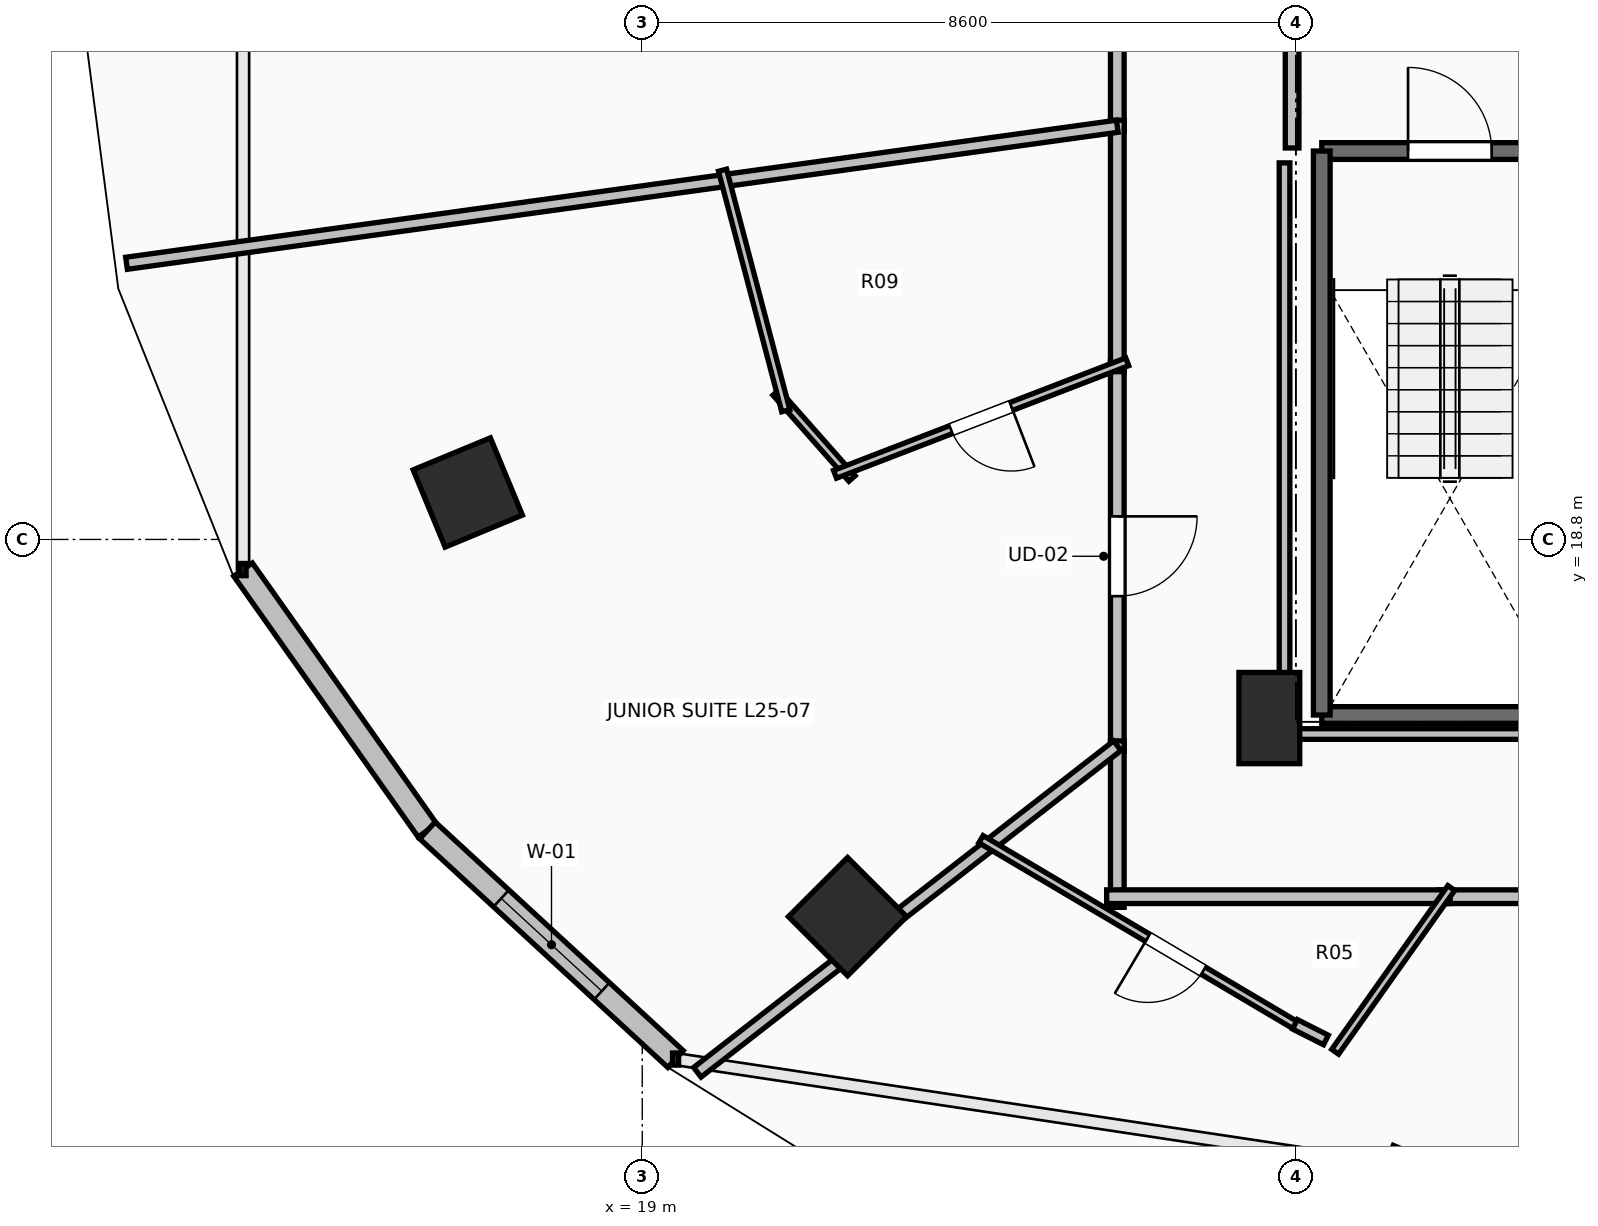
"""IFC4 building model, lengths in metres.
Left out: names, types, materials, properties, quantities, classifications, styles, units other than length and angle.
Written with IfcOpenShell. Run it as: python <this file> out.ifc"""

import sys

from ifc_helpers import new_model, si_unit, direction, frame, frame_2d, origin, origin_2d, place, context, subcontext, project, spatial, rectangle, extrude, element, fill, save


model = new_model("IFC4")
c1 = context("Model", 3, precision=1e-05, world=origin(), true_north=direction((0.0, 1.0)))
c2 = subcontext(c1, "Body", "Model", "MODEL_VIEW")
j1 = project(units=[si_unit("LENGTHUNIT", "METRE"), si_unit("PLANEANGLEUNIT", "RADIAN")], contexts=[c1])
p1 = place(None, origin())
s1 = spatial("IfcSite", under=j1, at=p1, CompositionType="ELEMENT")
p2 = place(p1, origin())
s2 = spatial("IfcBuilding", under=s1, at=p2, CompositionType="ELEMENT")
p3 = place(p2, frame((0.0, 0.0, 96.3)))
s3 = spatial("IfcBuildingStorey", under=s2, at=p3, CompositionType="ELEMENT", Elevation=96.3)
for number, where, z_axis, x_axis in (
    (1, (16.705, 19.418, 0.0), (0.0, 0.0, 1.0), (-0.924, -0.383, 0.0)),
    (2, (21.701, 13.838, 0.0), (0.0, 0.0, 1.0), (-0.707, -0.707, 0.0)),
    (3, (29.179, 10.109, 0.0), (0.0, 0.0, 1.0), (-0.383, -0.924, 0.0)),
):
    element("IfcColumn", number, at=place(p3, frame(where, z_axis=z_axis, x_axis=x_axis)), inside=s3, PredefinedType="COLUMN", context=c2, shape_type="SweptSolid", body=[
        extrude(rectangle(XDim=1.1, YDim=1.1, at=origin_2d()), origin(), (0.0, 0.0, 1.0), 3.5),
    ])
p4 = place(p3, frame((27.25, 16.45, 0.0), z_axis=(0.0, 0.0, 1.0), x_axis=(1.0, 0.0, 0.0)))
e4 = element("IfcColumn", 4, at=p4, inside=s3, PredefinedType="PILASTER", context=c2, shape_type="SweptSolid", body=[
    extrude(rectangle(XDim=0.8, YDim=1.2, at=origin_2d()), origin(), (0.0, 0.0, 1.0), 3.5),
])
p5 = place(p3, frame((13.748, 18.404, 0.0), z_axis=(0.0, 0.0, 1.0), x_axis=(0.57716435238, -0.81662801222, 0.0)))
e5 = element("IfcWall", 5, at=p5, inside=s3, PredefinedType="STANDARD", context=c2, shape_type="SweptSolid", body=[
    extrude(rectangle(XDim=4.202, YDim=0.3, at=frame_2d((2.101, 0.0))), origin(), (0.0, 0.0, 1.0), 3.24),
])
p6 = place(p3, frame((16.174, 14.972, 0.0), z_axis=(0.0, 0.0, 1.0), x_axis=(0.735416718093, -0.677615119924, 0.0)))
e6 = element("IfcWall", 6, at=p6, inside=s3, PredefinedType="STANDARD", context=c2, shape_type="SweptSolid", body=[
    extrude(rectangle(XDim=4.439, YDim=0.3, at=frame_2d((2.22, 0.0))), origin(), (0.0, 0.0, 1.0), 3.24),
])
p7 = place(p6, frame((1.32, 0.0, 0.85)))
e7 = element("IfcOpeningElement", 7, at=p7, cuts=e6, PredefinedType="OPENING", context=c2, shape_type="SweptSolid", body=[
    extrude(rectangle(XDim=1.8, YDim=2.19, at=frame_2d((0.9, 1.095))), frame((0.0, 0.165, 0.0), z_axis=(0.0, -1.0, 0.0), x_axis=(1.0, 0.0, 0.0)), (0.0, 0.0, 1.0), 0.33),
])
p8 = place(p3, frame((27.94, 23.91, 0.0), z_axis=(0.0, 0.0, 1.0), x_axis=(1.0, 0.0, 0.0)))
e8 = element("IfcWall", 8, at=p8, inside=s3, PredefinedType="SOLIDWALL", context=c2, shape_type="SweptSolid", body=[
    extrude(rectangle(XDim=3.37, YDim=0.22, at=frame_2d((1.685, 0.0))), origin(), (0.0, 0.0, 1.0), 3.24),
])
p9 = place(p8, frame((1.135, 0.0, 0.0)))
e9 = element("IfcOpeningElement", 9, at=p9, cuts=e8, PredefinedType="OPENING", context=c2, shape_type="SweptSolid", body=[
    extrude(rectangle(XDim=1.1, YDim=2.15, at=frame_2d((0.55, 1.075))), frame((0.0, 0.125, 0.0), z_axis=(0.0, -1.0, 0.0), x_axis=(1.0, 0.0, 0.0)), (0.0, 0.0, 1.0), 0.25),
])
p10 = place(p3, frame((31.31, 16.49, 0.0), z_axis=(0.0, 0.0, 1.0), x_axis=(-1.0, 0.0, 0.0)))
e10 = element("IfcWall", 10, at=p10, inside=s3, PredefinedType="SOLIDWALL", context=c2, shape_type="SweptSolid", body=[
    extrude(rectangle(XDim=3.37, YDim=0.22, at=frame_2d((1.685, 0.0))), origin(), (0.0, 0.0, 1.0), 3.24),
])
p11 = place(p3, frame((27.94, 16.49, 0.0), z_axis=(0.0, 0.0, 1.0), x_axis=(0.0, 1.0, 0.0)))
e11 = element("IfcWall", 11, at=p11, inside=s3, PredefinedType="SOLIDWALL", context=c2, shape_type="SweptSolid", body=[
    extrude(rectangle(XDim=7.42, YDim=0.22, at=frame_2d((3.71, 0.0))), origin(), (0.0, 0.0, 1.0), 3.24),
])
p12 = place(p3, frame((27.55, 28.0, 0.0), z_axis=(0.0, 0.0, 1.0), x_axis=(0.0, -1.0, 0.0)))
e12 = element("IfcWall", 12, at=p12, inside=s3, PredefinedType="PARTITIONING", context=c2, shape_type="SweptSolid", body=[
    extrude(rectangle(XDim=4.05, YDim=0.18, at=frame_2d((2.025, 0.0))), origin(), (0.0, 0.0, 1.0), 3.24),
])
p13 = place(p12, frame((1.425, 0.0, 0.0)))
e13 = element("IfcOpeningElement", 13, at=p13, cuts=e12, PredefinedType="OPENING", context=c2, shape_type="SweptSolid", body=[
    extrude(rectangle(XDim=1.2, YDim=2.15, at=frame_2d((0.6, 1.075))), frame((0.0, 0.105, 0.0), z_axis=(0.0, -1.0, 0.0), x_axis=(1.0, 0.0, 0.0)), (0.0, 0.0, 1.0), 0.21),
])
p14 = place(p3, frame((25.25, 28.065, 0.0), z_axis=(0.0, 0.0, 1.0), x_axis=(0.0, -1.0, 0.0)))
e14 = element("IfcWall", 14, at=p14, inside=s3, PredefinedType="PARTITIONING", context=c2, shape_type="SweptSolid", body=[
    extrude(rectangle(XDim=3.89, YDim=0.18, at=frame_2d((1.945, 0.0))), origin(), (0.0, 0.0, 1.0), 2.432),
])
p15 = place(p14, frame((1.42, 0.0, 0.0)))
e15 = element("IfcOpeningElement", 15, at=p15, cuts=e14, PredefinedType="OPENING", context=c2, shape_type="SweptSolid", body=[
    extrude(rectangle(XDim=1.05, YDim=2.2, at=frame_2d((0.525, 1.1))), frame((0.0, 0.105, 0.0), z_axis=(0.0, -1.0, 0.0), x_axis=(1.0, 0.0, 0.0)), (0.0, 0.0, 1.0), 0.21),
])
p16 = place(p3, frame((25.25, 21.147, 0.0), z_axis=(0.0, 0.0, 1.0), x_axis=(0.0, -1.0, 0.0)))
e16 = element("IfcWall", 16, at=p16, inside=s3, PredefinedType="PARTITIONING", context=c2, shape_type="SweptSolid", body=[
    extrude(rectangle(XDim=5.137, YDim=0.18, at=frame_2d((2.568, 0.0))), origin(), (0.0, 0.0, 1.0), 2.432),
])
p17 = place(p16, frame((2.043, 0.0, 0.0)))
e17 = element("IfcOpeningElement", 17, at=p17, cuts=e16, PredefinedType="OPENING", context=c2, shape_type="SweptSolid", body=[
    extrude(rectangle(XDim=1.05, YDim=2.2, at=frame_2d((0.525, 1.1))), frame((0.0, 0.105, 0.0), z_axis=(0.0, -1.0, 0.0), x_axis=(1.0, 0.0, 0.0)), (0.0, 0.0, 1.0), 0.21),
])
p18 = place(p3, frame((25.25, 24.315, 0.0), z_axis=(0.0, 0.0, 1.0), x_axis=(0.0, -1.0, 0.0)))
e18 = element("IfcWall", 18, at=p18, inside=s3, PredefinedType="PARTITIONING", context=c2, shape_type="SweptSolid", body=[
    extrude(rectangle(XDim=3.308, YDim=0.18, at=frame_2d((1.654, 0.0))), origin(), (0.0, 0.0, 1.0), 3.24),
])
p19 = place(p3, frame((29.489, 14.1, 0.0), z_axis=(0.0, 0.0, 1.0), x_axis=(1.0, 0.0, 0.0)))
e19 = element("IfcWall", 19, at=p19, inside=s3, PredefinedType="PARTITIONING", context=c2, shape_type="SweptSolid", body=[
    extrude(rectangle(XDim=3.729, YDim=0.18, at=frame_2d((1.865, 0.0))), origin(), (0.0, 0.0, 1.0), 3.24),
])
p20 = place(p19, frame((1.365, 0.0, 0.0)))
e20 = element("IfcOpeningElement", 20, at=p20, cuts=e19, PredefinedType="OPENING", context=c2, shape_type="SweptSolid", body=[
    extrude(rectangle(XDim=1.0, YDim=2.15, at=frame_2d((0.5, 1.075))), frame((0.0, 0.105, 0.0), z_axis=(0.0, -1.0, 0.0), x_axis=(1.0, 0.0, 0.0)), (0.0, 0.0, 1.0), 0.21),
])
p21 = place(p3, frame((25.25, 16.15, 0.0), z_axis=(0.0, 0.0, 1.0), x_axis=(0.0, -1.0, 0.0)))
e21 = element("IfcWall", 21, at=p21, inside=s3, PredefinedType="PARTITIONING", context=c2, shape_type="SweptSolid", body=[
    extrude(rectangle(XDim=2.19, YDim=0.18, at=frame_2d((1.095, 0.0))), origin(), (0.0, 0.0, 1.0), 2.432),
])
p22 = place(p3, frame((25.11, 14.1, 0.0), z_axis=(0.0, 0.0, 1.0), x_axis=(1.0, 0.0, 0.0)))
e22 = element("IfcWall", 22, at=p22, inside=s3, PredefinedType="PARTITIONING", context=c2, shape_type="SweptSolid", body=[
    extrude(rectangle(XDim=4.519, YDim=0.18, at=frame_2d((2.259, 0.0))), origin(), (0.0, 0.0, 1.0), 2.432),
])
p23 = place(p3, frame((12.215, 22.433, 0.0), z_axis=(0.0, 0.0, 1.0), x_axis=(0.990569013426, 0.137014705927, 0.0)))
e23 = element("IfcWall", 23, at=p23, inside=s3, PredefinedType="PARTITIONING", context=c2, shape_type="SweptSolid", body=[
    extrude(rectangle(XDim=13.159, YDim=0.16, at=frame_2d((6.58, 0.0))), origin(), (0.0, 0.0, 1.0), 2.677),
])
p24 = place(p3, frame((21.76, 19.602, 0.0), z_axis=(0.0, 0.0, 1.0), x_axis=(-0.661931735756, 0.749564124808, 0.0)))
e24 = element("IfcWall", 24, at=p24, inside=s3, PredefinedType="PARTITIONING", context=c2, shape_type="SweptSolid", body=[
    extrude(rectangle(XDim=1.51, YDim=0.11, at=frame_2d((0.755, 0.0))), origin(), (0.0, 0.0, 1.0), 3.24),
])
p25 = place(p3, frame((20.889, 20.494, 0.0), z_axis=(0.0, 0.0, 1.0), x_axis=(-0.254405137241, 0.967097733502, 0.0)))
e25 = element("IfcWall", 25, at=p25, inside=s3, PredefinedType="PARTITIONING", context=c2, shape_type="SweptSolid", body=[
    extrude(rectangle(XDim=3.271, YDim=0.11, at=frame_2d((1.636, 0.0))), origin(), (0.0, 0.0, 1.0), 2.922),
])
p26 = place(p3, frame((25.381, 21.137, 0.0), z_axis=(0.0, 0.0, 1.0), x_axis=(-0.933189718051, -0.359384126144, 0.0)))
e26 = element("IfcWall", 26, at=p26, inside=s3, PredefinedType="PARTITIONING", context=c2, shape_type="SweptSolid", body=[
    extrude(rectangle(XDim=4.119, YDim=0.11, at=frame_2d((2.06, 0.0))), origin(), (0.0, 0.0, 1.0), 2.972),
])
p27 = place(p26, frame((1.635, 0.0, 0.0)))
e27 = element("IfcOpeningElement", 27, at=p27, cuts=e26, PredefinedType="OPENING", context=c2, shape_type="SweptSolid", body=[
    extrude(rectangle(XDim=0.85, YDim=2.1, at=frame_2d((0.425, 1.05))), frame((0.0, 0.07, 0.0), z_axis=(0.0, -1.0, 0.0), x_axis=(1.0, 0.0, 0.0)), (0.0, 0.0, 1.0), 0.14),
])
p28 = place(p3, frame((19.725, 11.79, 0.0), z_axis=(0.0, 0.0, 1.0), x_axis=(0.789438616042, 0.613829513384, 0.0)))
e28 = element("IfcWall", 28, at=p28, inside=s3, PredefinedType="PARTITIONING", context=c2, shape_type="SweptSolid", body=[
    extrude(rectangle(XDim=6.999, YDim=0.16, at=frame_2d((3.499, 0.0))), origin(), (0.0, 0.0, 1.0), 2.432),
])
p29 = place(p3, frame((27.611, 12.399, 0.0), z_axis=(0.0, 0.0, 1.0), x_axis=(-0.860667615303, 0.509167218081, 0.0)))
e29 = element("IfcWall", 29, at=p29, inside=s3, PredefinedType="PARTITIONING", context=c2, shape_type="SweptSolid", body=[
    extrude(rectangle(XDim=4.827, YDim=0.11, at=frame_2d((2.413, 0.0))), origin(), (0.0, 0.0, 1.0), 2.432),
])
p30 = place(p29, frame((1.428, 0.0, 0.0)))
e30 = element("IfcOpeningElement", 30, at=p30, cuts=e29, PredefinedType="OPENING", context=c2, shape_type="SweptSolid", body=[
    extrude(rectangle(XDim=0.85, YDim=2.1, at=frame_2d((0.425, 1.05))), frame((0.0, 0.07, 0.0), z_axis=(0.0, -1.0, 0.0), x_axis=(1.0, 0.0, 0.0)), (0.0, 0.0, 1.0), 0.14),
])
p31 = place(p3, frame((29.644, 14.214, 0.0), z_axis=(0.0, 0.0, 1.0), x_axis=(-0.578550668744, -0.815646445279, 0.0)))
e31 = element("IfcWall", 31, at=p31, inside=s3, PredefinedType="PARTITIONING", context=c2, shape_type="SweptSolid", body=[
    extrude(rectangle(XDim=2.641, YDim=0.11, at=frame_2d((1.321, 0.0))), origin(), (0.0, 0.0, 1.0), 2.432),
])
p32 = place(p3, frame((30.318, 7.12, 0.0), z_axis=(0.0, 0.0, 1.0), x_axis=(0.376920780929, 0.926245499263, 0.0)))
e32 = element("IfcWall", 32, at=p32, inside=s3, PredefinedType="PARTITIONING", context=c2, shape_type="SweptSolid", body=[
    extrude(rectangle(XDim=6.166, YDim=0.16, at=frame_2d((3.083, 0.0))), origin(), (0.0, 0.0, 1.0), 2.677),
])
p33 = place(p3, frame((31.195, 16.24, 0.0), z_axis=(0.0, 0.0, 1.0), x_axis=(-1.0, 0.0, 0.0)))
e33 = element("IfcWall", 33, at=p33, inside=s3, PredefinedType="PARTITIONING", context=c2, shape_type="SweptSolid", body=[
    extrude(rectangle(XDim=3.745, YDim=0.14, at=frame_2d((1.873, 0.0))), origin(), (0.0, 0.0, 1.0), 2.432),
])
p34 = place(p3, frame((27.45, 16.24, 0.0), z_axis=(0.0, 0.0, 1.0), x_axis=(0.0, 1.0, 0.0)))
e34 = element("IfcWall", 34, at=p34, inside=s3, PredefinedType="PARTITIONING", context=c2, shape_type="SweptSolid", body=[
    extrude(rectangle(XDim=7.514, YDim=0.14, at=frame_2d((3.757, 0.0))), origin(), (0.0, 0.0, 1.0), 2.432),
])
p35 = place(p3, frame((27.587, 12.421, 0.0), z_axis=(0.0, 0.0, 1.0), x_axis=(0.892279780373, -0.451482882884, 0.0)))
e35 = element("IfcWall", 35, at=p35, inside=s3, PredefinedType="PARTITIONING", context=c2, shape_type="SweptSolid", body=[
    extrude(rectangle(XDim=0.457, YDim=0.14, at=frame_2d((0.229, 0.0))), origin(), (0.0, 0.0, 1.0), 3.24),
])
p36 = place(p7, origin())
e36 = element("IfcWindow", 36, at=p36, inside=s3, PartitioningType="SINGLE_PANEL", PredefinedType="WINDOW", context=c2, shape_type="SweptSolid", body=[
    extrude(rectangle(XDim=1.8, YDim=2.19, at=frame_2d((0.9, 1.095))), frame((0.0, 0.03, 0.0), z_axis=(0.0, -1.0, 0.0), x_axis=(1.0, 0.0, 0.0)), (0.0, 0.0, 1.0), 0.06),
])
fill(e7, e36)
p37 = place(p9, origin())
e37 = element("IfcDoor", 37, at=p37, inside=s3, OperationType="SINGLE_SWING_LEFT", PredefinedType="DOOR", context=c2, shape_type="SweptSolid", body=[
    extrude(rectangle(XDim=1.1, YDim=2.15, at=frame_2d((0.55, 1.075))), frame((0.0, 0.025, 0.0), z_axis=(0.0, -1.0, 0.0), x_axis=(1.0, 0.0, 0.0)), (0.0, 0.0, 1.0), 0.05),
])
fill(e9, e37)
p38 = place(p17, origin())
e38 = element("IfcDoor", 38, at=p38, inside=s3, OperationType="SINGLE_SWING_LEFT", PredefinedType="DOOR", context=c2, shape_type="SweptSolid", body=[
    extrude(rectangle(XDim=1.05, YDim=2.2, at=frame_2d((0.525, 1.1))), frame((0.0, 0.025, 0.0), z_axis=(0.0, -1.0, 0.0), x_axis=(1.0, 0.0, 0.0)), (0.0, 0.0, 1.0), 0.05),
])
fill(e17, e38)
p39 = place(p27, origin())
e39 = element("IfcDoor", 39, at=p39, inside=s3, OperationType="SINGLE_SWING_LEFT", PredefinedType="DOOR", context=c2, shape_type="SweptSolid", body=[
    extrude(rectangle(XDim=0.85, YDim=2.1, at=frame_2d((0.425, 1.05))), frame((0.0, 0.025, 0.0), z_axis=(0.0, -1.0, 0.0), x_axis=(1.0, 0.0, 0.0)), (0.0, 0.0, 1.0), 0.05),
])
fill(e27, e39)
p40 = place(p30, origin())
e40 = element("IfcDoor", 40, at=p40, inside=s3, OperationType="SINGLE_SWING_RIGHT", PredefinedType="DOOR", context=c2, shape_type="SweptSolid", body=[
    extrude(rectangle(XDim=0.85, YDim=2.1, at=frame_2d((0.425, 1.05))), frame((0.0, 0.025, 0.0), z_axis=(0.0, -1.0, 0.0), x_axis=(1.0, 0.0, 0.0)), (0.0, 0.0, 1.0), 0.05),
])
fill(e30, e40)
save(model, sys.argv[1])
